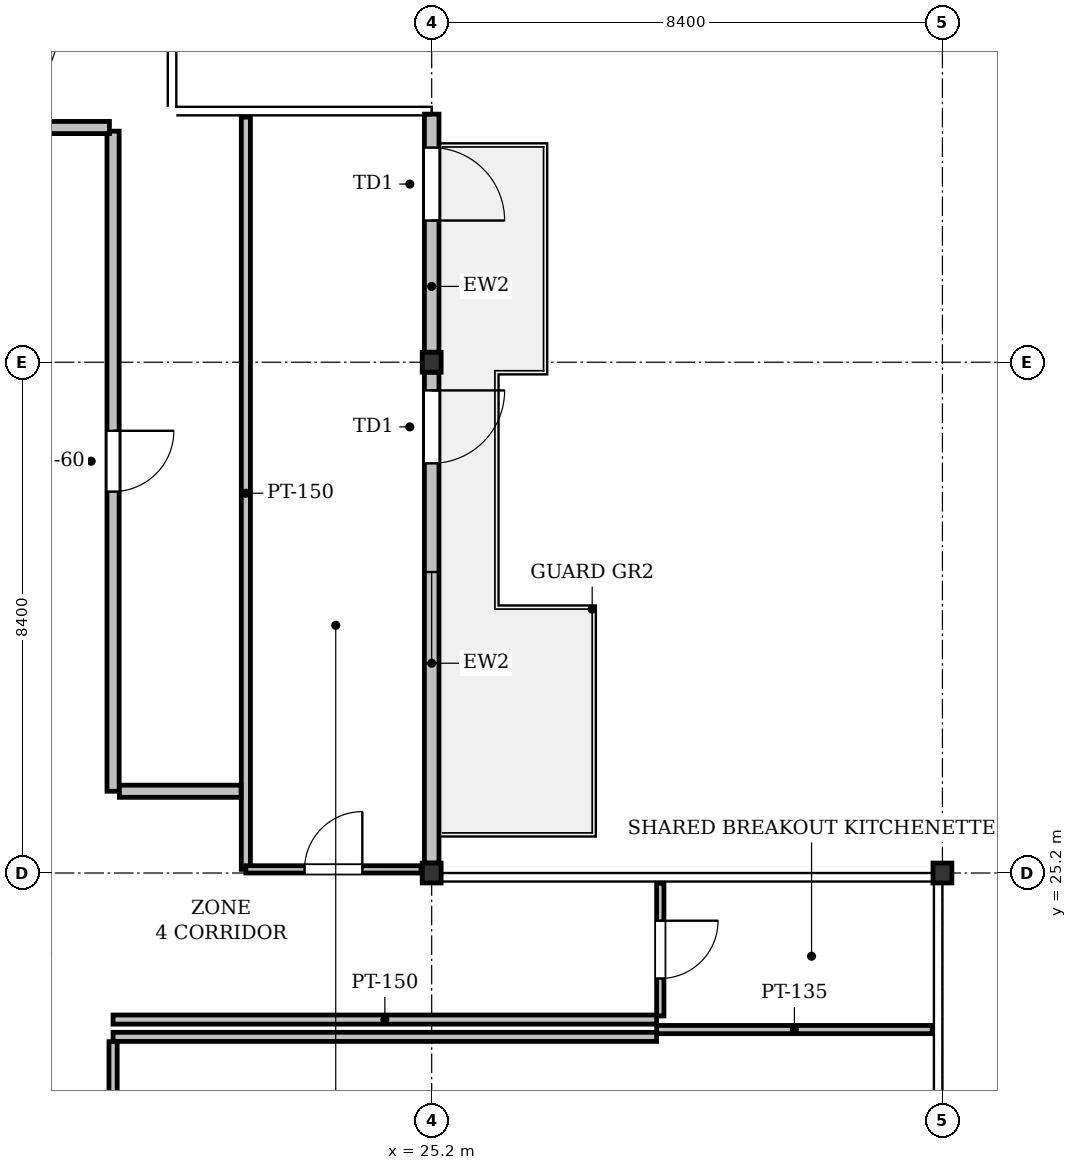
"""IFC4 building model, lengths in metres.
Left out: names, types, materials, properties, quantities, classifications, styles, units other than length and angle.
Written with IfcOpenShell. Run it as: python <this file> out.ifc"""

import sys

from ifc_helpers import new_model, si_unit, direction, frame, frame_2d, origin, origin_2d, place, context, subcontext, project, spatial, rectangle, i_section, extrude, element, fill, save


model = new_model("IFC4")
c1 = context("Model", 3, precision=1e-05, world=origin(), true_north=direction((0.0, 1.0)))
c2 = subcontext(c1, "Body", "Model", "MODEL_VIEW")
j1 = project(units=[si_unit("LENGTHUNIT", "METRE"), si_unit("PLANEANGLEUNIT", "RADIAN")], contexts=[c1])
p1 = place(None, origin())
s1 = spatial("IfcSite", under=j1, at=p1, CompositionType="ELEMENT")
p2 = place(p1, origin())
s2 = spatial("IfcBuilding", under=s1, at=p2, CompositionType="ELEMENT")
p3 = place(p2, frame((0.0, 0.0, 290.2)))
s3 = spatial("IfcBuildingStorey", under=s2, at=p3, CompositionType="ELEMENT", Elevation=290.2)
for number, where, z_axis, x_axis in (
    (1, (25.2, 25.2, 0.0), (0.0, 0.0, 1.0), (1.0, 0.0, 0.0)),
    (2, (25.2, 33.6, 0.0), (0.0, 0.0, 1.0), (1.0, 0.0, 0.0)),
    (3, (33.6, 25.2, 0.0), (0.0, 0.0, 1.0), (1.0, 0.0, 0.0)),
):
    element("IfcColumn", number, at=place(p3, frame(where, z_axis=z_axis, x_axis=x_axis)), inside=s3, PredefinedType="COLUMN", context=c2, shape_type="SweptSolid", body=[
        extrude(i_section(OverallWidth=0.311, OverallDepth=0.327, WebThickness=0.016, FlangeThickness=0.025, FilletRadius=0.017, at=origin_2d()), origin(), (0.0, 0.0, 1.0), 4.0),
    ])
p4 = place(p3, frame((25.2, 37.68, 0.0), z_axis=(0.0, 0.0, 1.0), x_axis=(0.0, -1.0, 0.0)))
e4 = element("IfcWall", 4, at=p4, inside=s3, PredefinedType="STANDARD", context=c2, shape_type="SweptSolid", body=[
    extrude(rectangle(XDim=3.917, YDim=0.24, at=frame_2d((1.958, 0.0))), origin(), (0.0, 0.0, 1.0), 3.725),
])
p5 = place(p4, frame((0.55, 0.0, 0.0)))
e5 = element("IfcOpeningElement", 5, at=p5, cuts=e4, PredefinedType="OPENING", context=c2, shape_type="SweptSolid", body=[
    extrude(rectangle(XDim=1.2, YDim=2.2, at=frame_2d((0.6, 1.1))), frame((0.0, 0.13, 0.0), z_axis=(0.0, -1.0, 0.0), x_axis=(1.0, 0.0, 0.0)), (0.0, 0.0, 1.0), 0.26),
])
p6 = place(p3, frame((25.2, 33.437, 0.0), z_axis=(0.0, 0.0, 1.0), x_axis=(0.0, -1.0, 0.0)))
e6 = element("IfcWall", 6, at=p6, inside=s3, PredefinedType="STANDARD", context=c2, shape_type="SweptSolid", body=[
    extrude(rectangle(XDim=8.073, YDim=0.24, at=frame_2d((4.037, 0.0))), origin(), (0.0, 0.0, 1.0), 3.475),
])
p7 = place(p6, frame((0.3, 0.0, 0.0)))
e7 = element("IfcOpeningElement", 7, at=p7, cuts=e6, PredefinedType="OPENING", context=c2, shape_type="SweptSolid", body=[
    extrude(rectangle(XDim=1.2, YDim=2.2, at=frame_2d((0.6, 1.1))), frame((0.0, 0.13, 0.0), z_axis=(0.0, -1.0, 0.0), x_axis=(1.0, 0.0, 0.0)), (0.0, 0.0, 1.0), 0.26),
])
p8 = place(p6, frame((3.287, 0.0, 0.9)))
e8 = element("IfcOpeningElement", 8, at=p8, cuts=e6, PredefinedType="OPENING", context=c2, shape_type="SweptSolid", body=[
    extrude(rectangle(XDim=1.5, YDim=1.6, at=frame_2d((0.75, 0.8))), frame((0.0, 0.13, 0.0), z_axis=(0.0, -1.0, 0.0), x_axis=(1.0, 0.0, 0.0)), (0.0, 0.0, 1.0), 0.26),
])
p9 = place(p3, frame((28.9, 22.79, 0.0), z_axis=(0.0, 0.0, 1.0), x_axis=(-1.0, 0.0, 0.0)))
e9 = element("IfcWall", 9, at=p9, inside=s3, PredefinedType="PARTITIONING", context=c2, shape_type="SweptSolid", body=[
    extrude(rectangle(XDim=8.94, YDim=0.15, at=frame_2d((4.47, 0.0))), origin(), (0.0, 0.0, 1.0), 3.319),
])
p10 = place(p3, frame((28.9, 22.626, 0.0), z_axis=(0.0, 0.0, 1.0), x_axis=(1.0, 0.0, 0.0)))
e10 = element("IfcWall", 10, at=p10, inside=s3, PredefinedType="PARTITIONING", context=c2, shape_type="SweptSolid", body=[
    extrude(rectangle(XDim=4.531, YDim=0.135, at=frame_2d((2.266, 0.0))), origin(), (0.0, 0.0, 1.0), 3.421),
])
p11 = place(p3, frame((28.96, 25.031, 0.0), z_axis=(0.0, 0.0, 1.0), x_axis=(0.0, -1.0, 0.0)))
e11 = element("IfcWall", 11, at=p11, inside=s3, PredefinedType="PARTITIONING", context=c2, shape_type="SweptSolid", body=[
    extrude(rectangle(XDim=2.181, YDim=0.12, at=frame_2d((1.09, 0.0))), origin(), (0.0, 0.0, 1.0), 3.725),
])
p12 = place(p11, frame((0.615, 0.0, 0.0)))
e12 = element("IfcOpeningElement", 12, at=p12, cuts=e11, PredefinedType="OPENING", context=c2, shape_type="SweptSolid", body=[
    extrude(rectangle(XDim=0.95, YDim=2.15, at=frame_2d((0.475, 1.075))), frame((0.0, 0.07, 0.0), z_axis=(0.0, -1.0, 0.0), x_axis=(1.0, 0.0, 0.0)), (0.0, 0.0, 1.0), 0.14),
])
p13 = place(p3, frame((22.144, 37.631, 0.0), z_axis=(0.0, 0.0, 1.0), x_axis=(0.0, -1.0, 0.0)))
e13 = element("IfcWall", 13, at=p13, inside=s3, PredefinedType="PARTITIONING", context=c2, shape_type="SweptSolid", body=[
    extrude(rectangle(XDim=12.371, YDim=0.15, at=frame_2d((6.186, 0.0))), origin(), (0.0, 0.0, 1.0), 3.271),
])
p14 = place(p3, frame((22.144, 25.26, 0.0), z_axis=(0.0, 0.0, 1.0), x_axis=(0.999999996408, -8.4760129e-05, 0.0)))
e14 = element("IfcWall", 14, at=p14, inside=s3, PredefinedType="PARTITIONING", context=c2, shape_type="SweptSolid", body=[
    extrude(rectangle(XDim=2.88, YDim=0.12, at=frame_2d((1.44, 0.0))), origin(), (0.0, 0.0, 1.0), 3.271),
])
p15 = place(p14, frame((0.965, 0.0, 0.0)))
e15 = element("IfcOpeningElement", 15, at=p15, cuts=e14, PredefinedType="OPENING", context=c2, shape_type="SweptSolid", body=[
    extrude(rectangle(XDim=0.95, YDim=2.15, at=frame_2d((0.475, 1.075))), frame((0.0, 0.07, 0.0), z_axis=(0.0, -1.0, 0.0), x_axis=(1.0, 0.0, 0.0)), (0.0, 0.0, 1.0), 0.14),
])
p16 = place(p3, frame((28.9, 22.506, 0.0), z_axis=(0.0, 0.0, 1.0), x_axis=(-1.0, 0.0, 0.0)))
e16 = element("IfcWall", 16, at=p16, inside=s3, PredefinedType="PARTITIONING", context=c2, shape_type="SweptSolid", body=[
    extrude(rectangle(XDim=8.94, YDim=0.15, at=frame_2d((4.47, 0.0))), origin(), (0.0, 0.0, 1.0), 3.319),
])
p17 = place(p3, frame((19.96, 22.427, 0.0), z_axis=(0.0, 0.0, 1.0), x_axis=(0.0, -1.0, 0.0)))
e17 = element("IfcWall", 17, at=p17, inside=s3, PredefinedType="PARTITIONING", context=c2, shape_type="SweptSolid", body=[
    extrude(rectangle(XDim=3.317, YDim=0.135, at=frame_2d((1.658, 0.0))), origin(), (0.0, 0.0, 1.0), 3.725),
])
p18 = place(p3, frame((19.96, 37.4, 0.0), z_axis=(0.0, 0.0, 1.0), x_axis=(0.0, -1.0, 0.0)))
e18 = element("IfcWall", 18, at=p18, inside=s3, PredefinedType="PARTITIONING", context=c2, shape_type="SweptSolid", body=[
    extrude(rectangle(XDim=10.855, YDim=0.2, at=frame_2d((5.427, 0.0))), origin(), (0.0, 0.0, 1.0), 3.271),
])
p19 = place(p18, frame((4.927, 0.0, 0.0)))
e19 = element("IfcOpeningElement", 19, at=p19, cuts=e18, PredefinedType="OPENING", context=c2, shape_type="SweptSolid", body=[
    extrude(rectangle(XDim=1.0, YDim=2.15, at=frame_2d((0.5, 1.075))), frame((0.0, 0.11, 0.0), z_axis=(0.0, -1.0, 0.0), x_axis=(1.0, 0.0, 0.0)), (0.0, 0.0, 1.0), 0.22),
])
p20 = place(p3, frame((20.064, 26.545, 0.0), z_axis=(0.0, 0.0, 1.0), x_axis=(1.0, 0.0, 0.0)))
e20 = element("IfcWall", 20, at=p20, inside=s3, PredefinedType="PARTITIONING", context=c2, shape_type="SweptSolid", body=[
    extrude(rectangle(XDim=2.001, YDim=0.2, at=frame_2d((1.0, 0.0))), origin(), (0.0, 0.0, 1.0), 3.421),
])
p21 = place(p3, frame((17.6, 37.46, 0.0), z_axis=(0.0, 0.0, 1.0), x_axis=(1.0, 0.0, 0.0)))
e21 = element("IfcWall", 21, at=p21, inside=s3, PredefinedType="PARTITIONING", context=c2, shape_type="SweptSolid", body=[
    extrude(rectangle(XDim=2.3, YDim=0.2, at=frame_2d((1.15, 0.0))), origin(), (0.0, 0.0, 1.0), 3.725),
])
p22 = place(p5, origin())
e22 = element("IfcDoor", 22, at=p22, inside=s3, OperationType="SINGLE_SWING_RIGHT", PredefinedType="DOOR", context=c2, shape_type="SweptSolid", body=[
    extrude(rectangle(XDim=1.2, YDim=2.2, at=frame_2d((0.6, 1.1))), frame((0.0, 0.025, 0.0), z_axis=(0.0, -1.0, 0.0), x_axis=(1.0, 0.0, 0.0)), (0.0, 0.0, 1.0), 0.05),
])
fill(e5, e22)
p23 = place(p7, origin())
e23 = element("IfcDoor", 23, at=p23, inside=s3, OperationType="SINGLE_SWING_LEFT", PredefinedType="DOOR", context=c2, shape_type="SweptSolid", body=[
    extrude(rectangle(XDim=1.2, YDim=2.2, at=frame_2d((0.6, 1.1))), frame((0.0, 0.025, 0.0), z_axis=(0.0, -1.0, 0.0), x_axis=(1.0, 0.0, 0.0)), (0.0, 0.0, 1.0), 0.05),
])
fill(e7, e23)
p24 = place(p8, origin())
e24 = element("IfcWindow", 24, at=p24, inside=s3, PartitioningType="SINGLE_PANEL", PredefinedType="WINDOW", context=c2, shape_type="SweptSolid", body=[
    extrude(rectangle(XDim=1.5, YDim=1.6, at=frame_2d((0.75, 0.8))), frame((0.0, 0.03, 0.0), z_axis=(0.0, -1.0, 0.0), x_axis=(1.0, 0.0, 0.0)), (0.0, 0.0, 1.0), 0.06),
])
fill(e8, e24)
p25 = place(p12, origin())
e25 = element("IfcDoor", 25, at=p25, inside=s3, OperationType="SINGLE_SWING_LEFT", PredefinedType="DOOR", context=c2, shape_type="SweptSolid", body=[
    extrude(rectangle(XDim=0.95, YDim=2.15, at=frame_2d((0.475, 1.075))), frame((0.0, 0.025, 0.0), z_axis=(0.0, -1.0, 0.0), x_axis=(1.0, 0.0, 0.0)), (0.0, 0.0, 1.0), 0.05),
])
fill(e12, e25)
p26 = place(p15, origin())
e26 = element("IfcDoor", 26, at=p26, inside=s3, OperationType="SINGLE_SWING_RIGHT", PredefinedType="DOOR", context=c2, shape_type="SweptSolid", body=[
    extrude(rectangle(XDim=0.95, YDim=2.15, at=frame_2d((0.475, 1.075))), frame((0.0, 0.025, 0.0), z_axis=(0.0, -1.0, 0.0), x_axis=(1.0, 0.0, 0.0)), (0.0, 0.0, 1.0), 0.05),
])
fill(e15, e26)
p27 = place(p19, origin())
e27 = element("IfcDoor", 27, at=p27, inside=s3, OperationType="SINGLE_SWING_LEFT", PredefinedType="DOOR", context=c2, shape_type="SweptSolid", body=[
    extrude(rectangle(XDim=1.0, YDim=2.15, at=frame_2d((0.5, 1.075))), frame((0.0, 0.025, 0.0), z_axis=(0.0, -1.0, 0.0), x_axis=(1.0, 0.0, 0.0)), (0.0, 0.0, 1.0), 0.05),
])
fill(e19, e27)
save(model, sys.argv[1])
